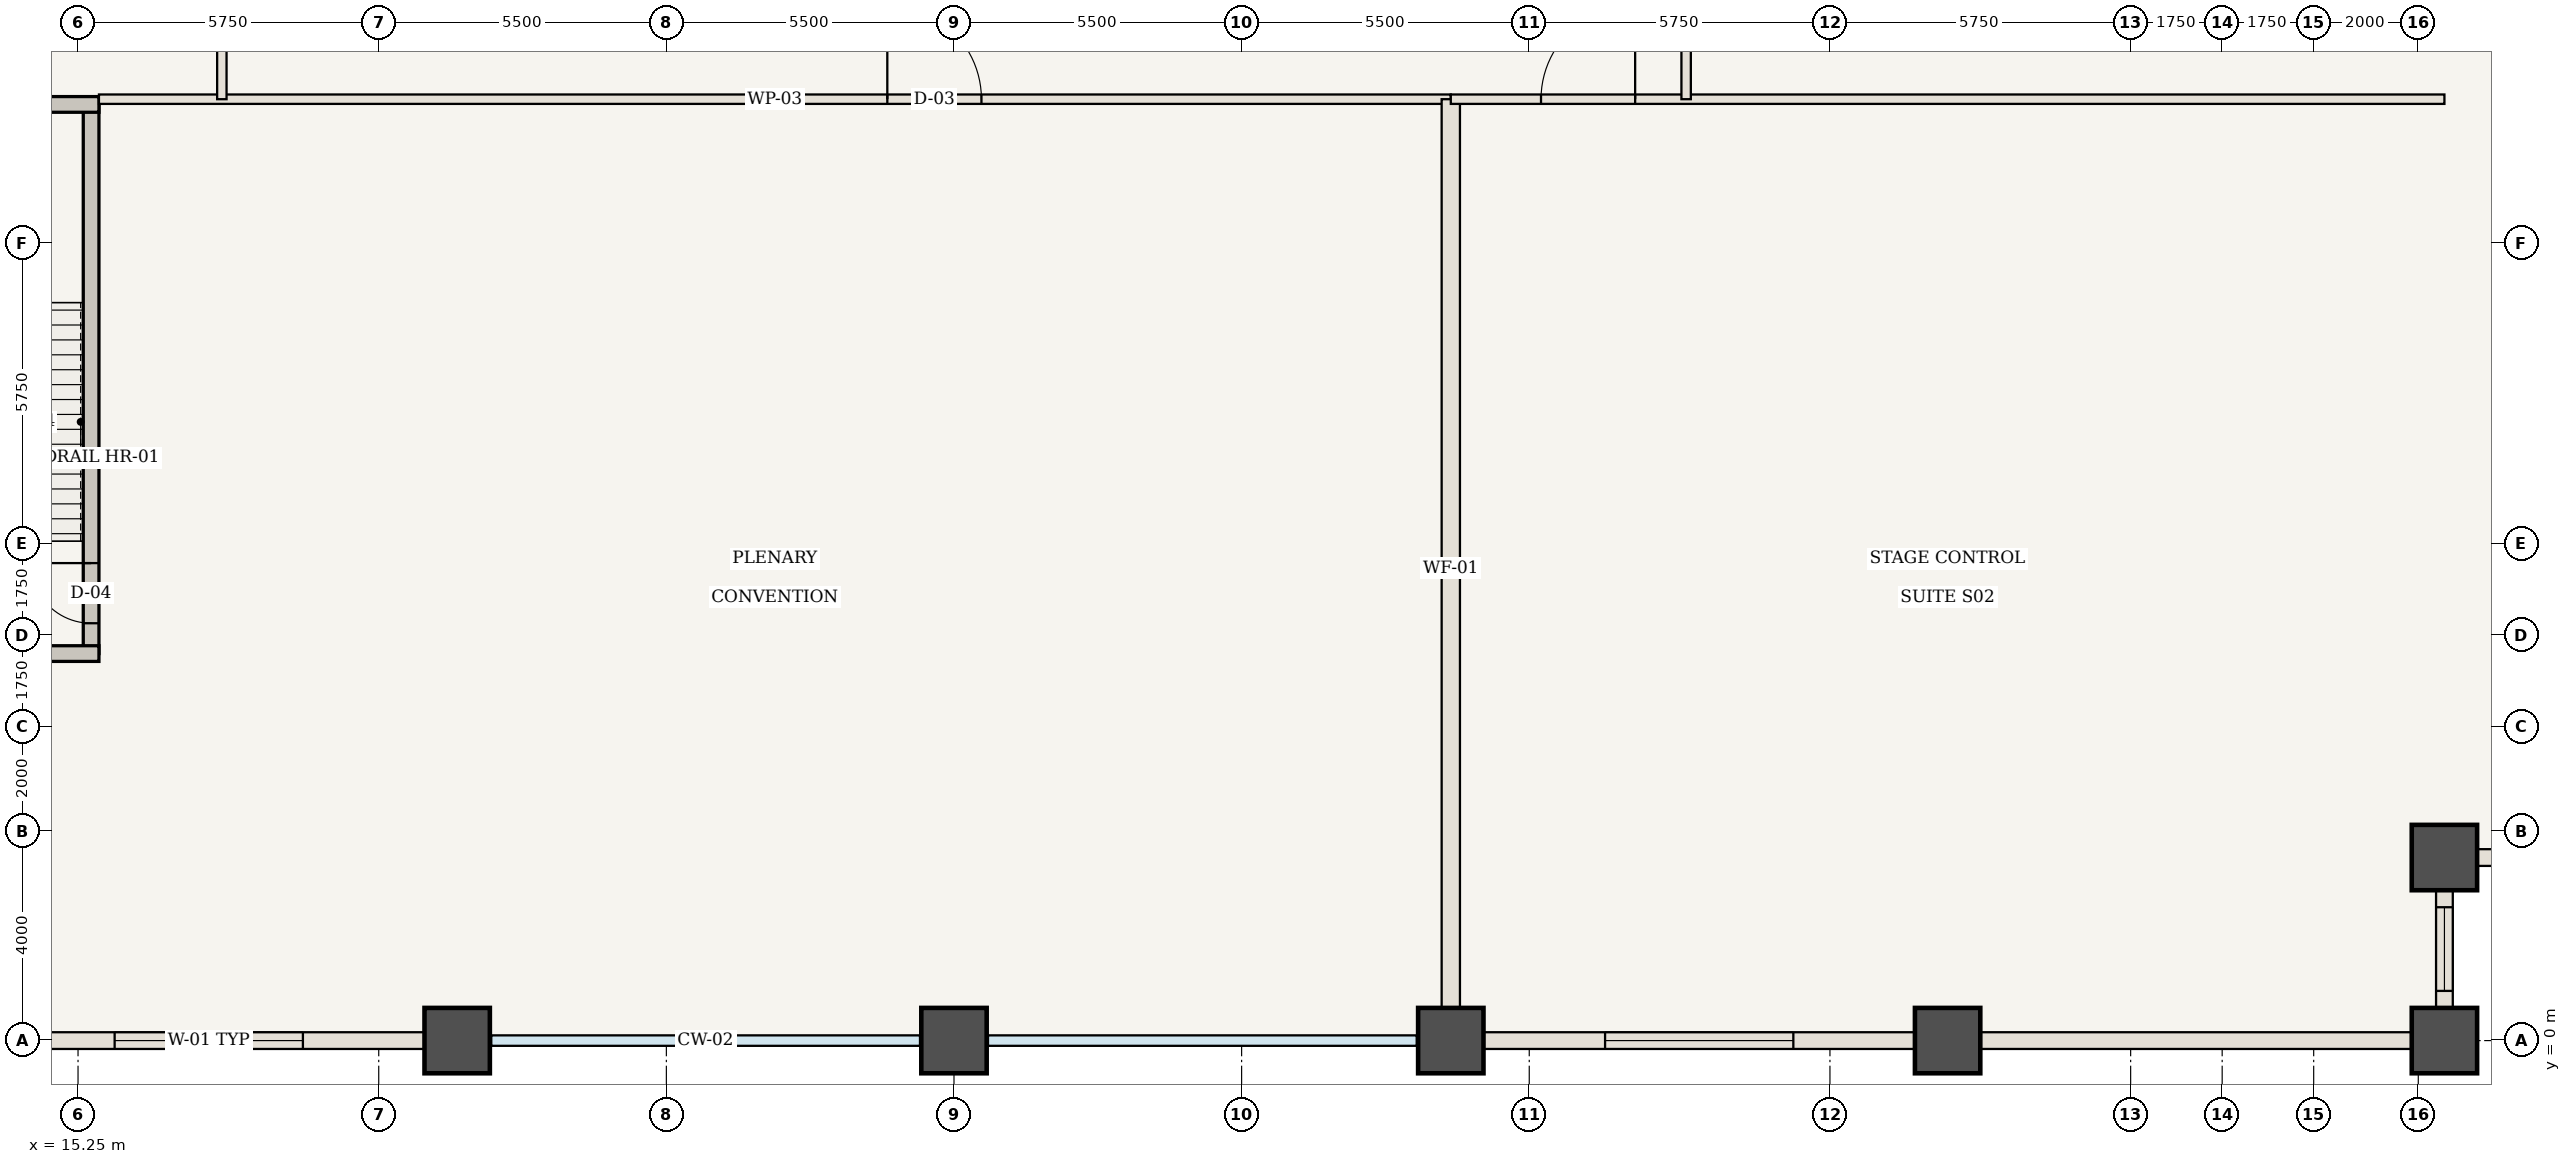
"""IFC4 building model, lengths in metres.
Left out: names, types, materials, properties, quantities, classifications, styles, units other than length and angle.
Written with IfcOpenShell. Run it as: python <this file> out.ifc"""

import sys

from ifc_helpers import new_model, si_unit, direction, frame, frame_2d, origin, origin_2d, place, context, subcontext, project, spatial, rectangle, extrude, element, fill, save


model = new_model("IFC4")
c1 = context("Model", 3, precision=1e-05, world=origin(), true_north=direction((0.0, 1.0)))
c2 = subcontext(c1, "Body", "Model", "MODEL_VIEW")
j1 = project(units=[si_unit("LENGTHUNIT", "METRE"), si_unit("PLANEANGLEUNIT", "RADIAN")], contexts=[c1])
p1 = place(None, origin())
s1 = spatial("IfcSite", under=j1, at=p1, CompositionType="ELEMENT")
p2 = place(p1, origin())
s2 = spatial("IfcBuilding", under=s1, at=p2, CompositionType="ELEMENT")
p3 = place(p2, frame((0.0, 0.0, 17.85)))
s3 = spatial("IfcBuildingStorey", under=s2, at=p3, CompositionType="ELEMENT", Elevation=17.85)
for number, where, z_axis, x_axis in (
    (1, (60.5, 0.0, 0.0), (0.0, 0.0, 1.0), (1.0, 0.0, 0.0)),
    (2, (60.5, 3.5, 0.0), (0.0, 0.0, 1.0), (1.0, 0.0, 0.0)),
    (3, (22.5, 0.0, 0.0), (0.0, 0.0, 1.0), (1.0, 0.0, 0.0)),
    (4, (32.0, 0.0, 0.0), (0.0, 0.0, 1.0), (1.0, 0.0, 0.0)),
    (5, (41.5, 0.0, 0.0), (0.0, 0.0, 1.0), (1.0, 0.0, 0.0)),
    (6, (51.0, 0.0, 0.0), (0.0, 0.0, 1.0), (1.0, 0.0, 0.0)),
):
    element("IfcColumn", number, at=place(p3, frame(where, z_axis=z_axis, x_axis=x_axis)), inside=s3, PredefinedType="COLUMN", context=c2, shape_type="SweptSolid", body=[
        extrude(rectangle(XDim=1.25, YDim=1.25, at=origin_2d()), origin(), (0.0, 0.0, 1.0), 5.95),
    ])
p4 = place(p3, frame((15.5, 7.4, 0.0), z_axis=(0.0, 0.0, 1.0), x_axis=(0.0, 1.0, 0.0)))
e7 = element("IfcWall", 7, at=p4, inside=s3, PredefinedType="SHEAR", context=c2, shape_type="SweptSolid", body=[
    extrude(rectangle(XDim=10.5, YDim=0.3, at=frame_2d((5.25, 0.0))), origin(), (0.0, 0.0, 1.0), 5.71),
])
p5 = place(p4, frame((0.58, 0.0, 0.0)))
e8 = element("IfcOpeningElement", 8, at=p5, cuts=e7, PredefinedType="OPENING", context=c2, shape_type="SweptSolid", body=[
    extrude(rectangle(XDim=1.15, YDim=2.15, at=frame_2d((0.575, 1.075))), frame((0.0, 0.16, 0.0), z_axis=(0.0, -1.0, 0.0), x_axis=(1.0, 0.0, 0.0)), (0.0, 0.0, 1.0), 0.32),
])
for number, where, z_axis, x_axis in (
    (9, (10.9, 7.4, 0.0), (0.0, 0.0, 1.0), (1.0, 0.0, 0.0)),
    (10, (10.9, 17.9, 0.0), (0.0, 0.0, 1.0), (1.0, 0.0, 0.0)),
):
    element("IfcWall", number, at=place(p3, frame(where, z_axis=z_axis, x_axis=x_axis)), inside=s3, PredefinedType="SHEAR", context=c2, shape_type="SweptSolid", body=[
        extrude(rectangle(XDim=4.75, YDim=0.3, at=frame_2d((2.375, 0.0))), origin(), (0.0, 0.0, 1.0), 5.71),
    ])
p6 = place(p3, frame((15.65, 18.0, 0.0), z_axis=(0.0, 0.0, 1.0), x_axis=(1.0, 0.0, 0.0)))
e11 = element("IfcWall", 11, at=p6, inside=s3, PredefinedType="STANDARD", context=c2, shape_type="SweptSolid", body=[
    extrude(rectangle(XDim=25.85, YDim=0.18, at=frame_2d((12.925, 0.0))), origin(), (0.0, 0.0, 1.0), 5.71),
])
p7 = place(p6, frame((15.075, 0.0, 0.0)))
e12 = element("IfcOpeningElement", 12, at=p7, cuts=e11, PredefinedType="OPENING", context=c2, shape_type="SweptSolid", body=[
    extrude(rectangle(XDim=1.8, YDim=2.35, at=frame_2d((0.9, 1.175))), frame((0.0, 0.1, 0.0), z_axis=(0.0, -1.0, 0.0), x_axis=(1.0, 0.0, 0.0)), (0.0, 0.0, 1.0), 0.2),
])
p8 = place(p3, frame((41.5, 0.06, 0.0), z_axis=(0.0, 0.0, 1.0), x_axis=(0.0, 1.0, 0.0)))
e13 = element("IfcWall", 13, at=p8, inside=s3, PredefinedType="STANDARD", context=c2, shape_type="SweptSolid", body=[
    extrude(rectangle(XDim=17.94, YDim=0.35, at=frame_2d((8.97, 0.0))), origin(), (0.0, 0.0, 1.0), 5.71),
])
p9 = place(p3, frame((41.5, 18.0, 0.0), z_axis=(0.0, 0.0, 1.0), x_axis=(1.0, 0.0, 0.0)))
e14 = element("IfcWall", 14, at=p9, inside=s3, PredefinedType="STANDARD", context=c2, shape_type="SweptSolid", body=[
    extrude(rectangle(XDim=19.0, YDim=0.18, at=frame_2d((9.5, 0.0))), origin(), (0.0, 0.0, 1.0), 5.71),
])
p10 = place(p9, frame((1.725, 0.0, 0.0)))
e15 = element("IfcOpeningElement", 15, at=p10, cuts=e14, PredefinedType="OPENING", context=c2, shape_type="SweptSolid", body=[
    extrude(rectangle(XDim=1.8, YDim=2.35, at=frame_2d((0.9, 1.175))), frame((0.0, 0.1, 0.0), z_axis=(0.0, -1.0, 0.0), x_axis=(1.0, 0.0, 0.0)), (0.0, 0.0, 1.0), 0.2),
])
p11 = place(p3, frame((18.0, 18.0, 0.0), z_axis=(0.0, 0.0, 1.0), x_axis=(0.0, 1.0, 0.0)))
e16 = element("IfcWall", 16, at=p11, inside=s3, PredefinedType="STANDARD", context=c2, shape_type="SweptSolid", body=[
    extrude(rectangle(XDim=13.2, YDim=0.18, at=frame_2d((6.6, 0.0))), origin(), (0.0, 0.0, 1.0), 5.71),
])
p12 = place(p11, frame((6.1, 0.0, 0.0)))
e17 = element("IfcOpeningElement", 17, at=p12, cuts=e16, PredefinedType="OPENING", context=c2, shape_type="SweptSolid", body=[
    extrude(rectangle(XDim=0.95, YDim=2.15, at=frame_2d((0.475, 1.075))), frame((0.0, 0.1, 0.0), z_axis=(0.0, -1.0, 0.0), x_axis=(1.0, 0.0, 0.0)), (0.0, 0.0, 1.0), 0.2),
])
p13 = place(p3, frame((46.0, 18.0, 0.0), z_axis=(0.0, 0.0, 1.0), x_axis=(0.0, 1.0, 0.0)))
e18 = element("IfcWall", 18, at=p13, inside=s3, PredefinedType="STANDARD", context=c2, shape_type="SweptSolid", body=[
    extrude(rectangle(XDim=14.8, YDim=0.18, at=frame_2d((7.4, 0.0))), origin(), (0.0, 0.0, 1.0), 5.71),
])
p14 = place(p13, frame((6.9, 0.0, 0.0)))
e19 = element("IfcOpeningElement", 19, at=p14, cuts=e18, PredefinedType="OPENING", context=c2, shape_type="SweptSolid", body=[
    extrude(rectangle(XDim=0.95, YDim=2.15, at=frame_2d((0.475, 1.075))), frame((0.0, 0.1, 0.0), z_axis=(0.0, -1.0, 0.0), x_axis=(1.0, 0.0, 0.0)), (0.0, 0.0, 1.0), 0.2),
])
p15 = place(p3, frame((22.5, 0.0, 0.0), z_axis=(0.0, 0.0, 1.0), x_axis=(-1.0, 0.0, 0.0)))
e20 = element("IfcWall", 20, at=p15, inside=s3, PredefinedType="USERDEFINED", context=c2, shape_type="SweptSolid", body=[
    extrude(rectangle(XDim=9.5, YDim=0.32, at=frame_2d((4.75, 0.0))), origin(), (0.0, 0.0, 1.0), 4.81),
])
p16 = place(p15, frame((2.95, 0.0, 0.85)))
e21 = element("IfcOpeningElement", 21, at=p16, cuts=e20, PredefinedType="OPENING", context=c2, shape_type="SweptSolid", body=[
    extrude(rectangle(XDim=3.6, YDim=2.6, at=frame_2d((1.8, 1.3))), frame((0.0, 0.17, 0.0), z_axis=(0.0, -1.0, 0.0), x_axis=(1.0, 0.0, 0.0)), (0.0, 0.0, 1.0), 0.34),
])
p17 = place(p3, frame((51.0, 0.0, 0.0), z_axis=(0.0, 0.0, 1.0), x_axis=(-1.0, 0.0, 0.0)))
e22 = element("IfcWall", 22, at=p17, inside=s3, PredefinedType="USERDEFINED", context=c2, shape_type="SweptSolid", body=[
    extrude(rectangle(XDim=9.5, YDim=0.32, at=frame_2d((4.75, 0.0))), origin(), (0.0, 0.0, 1.0), 4.81),
])
p18 = place(p17, frame((2.95, 0.0, 0.85)))
e23 = element("IfcOpeningElement", 23, at=p18, cuts=e22, PredefinedType="OPENING", context=c2, shape_type="SweptSolid", body=[
    extrude(rectangle(XDim=3.6, YDim=2.6, at=frame_2d((1.8, 1.3))), frame((0.0, 0.17, 0.0), z_axis=(0.0, -1.0, 0.0), x_axis=(1.0, 0.0, 0.0)), (0.0, 0.0, 1.0), 0.34),
])
p19 = place(p3, frame((60.5, 0.0, 0.0), z_axis=(0.0, 0.0, 1.0), x_axis=(-1.0, 0.0, 0.0)))
e24 = element("IfcWall", 24, at=p19, inside=s3, PredefinedType="USERDEFINED", context=c2, shape_type="SweptSolid", body=[
    extrude(rectangle(XDim=9.5, YDim=0.32, at=frame_2d((4.75, 0.0))), origin(), (0.0, 0.0, 1.0), 4.81),
])
p20 = place(p3, frame((60.5, 3.5, 0.0), z_axis=(0.0, 0.0, 1.0), x_axis=(0.0, -1.0, 0.0)))
e25 = element("IfcWall", 25, at=p20, inside=s3, PredefinedType="USERDEFINED", context=c2, shape_type="SweptSolid", body=[
    extrude(rectangle(XDim=3.5, YDim=0.32, at=frame_2d((1.75, 0.0))), origin(), (0.0, 0.0, 1.0), 4.81),
])
p21 = place(p20, frame((0.95, 0.0, 0.85)))
e26 = element("IfcOpeningElement", 26, at=p21, cuts=e25, PredefinedType="OPENING", context=c2, shape_type="SweptSolid", body=[
    extrude(rectangle(XDim=1.6, YDim=2.05, at=frame_2d((0.8, 1.025))), frame((0.0, 0.17, 0.0), z_axis=(0.0, -1.0, 0.0), x_axis=(1.0, 0.0, 0.0)), (0.0, 0.0, 1.0), 0.34),
])
p22 = place(p3, frame((64.0, 3.5, 0.0), z_axis=(0.0, 0.0, 1.0), x_axis=(-1.0, 0.0, 0.0)))
e27 = element("IfcWall", 27, at=p22, inside=s3, PredefinedType="USERDEFINED", context=c2, shape_type="SweptSolid", body=[
    extrude(rectangle(XDim=3.5, YDim=0.32, at=frame_2d((1.75, 0.0))), origin(), (0.0, 0.0, 1.0), 4.81),
])
p23 = place(p22, frame((0.95, 0.0, 0.85)))
e28 = element("IfcOpeningElement", 28, at=p23, cuts=e27, PredefinedType="OPENING", context=c2, shape_type="SweptSolid", body=[
    extrude(rectangle(XDim=1.6, YDim=2.05, at=frame_2d((0.8, 1.025))), frame((0.0, 0.17, 0.0), z_axis=(0.0, -1.0, 0.0), x_axis=(1.0, 0.0, 0.0)), (0.0, 0.0, 1.0), 0.34),
])
p24 = place(p5, origin())
e29 = element("IfcDoor", 29, at=p24, inside=s3, OperationType="SINGLE_SWING_RIGHT", PredefinedType="DOOR", context=c2, shape_type="SweptSolid", body=[
    extrude(rectangle(XDim=1.15, YDim=2.15, at=frame_2d((0.575, 1.075))), frame((0.0, 0.025, 0.0), z_axis=(0.0, -1.0, 0.0), x_axis=(1.0, 0.0, 0.0)), (0.0, 0.0, 1.0), 0.05),
])
fill(e8, e29)
p25 = place(p7, origin())
e30 = element("IfcDoor", 30, at=p25, inside=s3, OperationType="SINGLE_SWING_LEFT", PredefinedType="DOOR", context=c2, shape_type="SweptSolid", body=[
    extrude(rectangle(XDim=1.8, YDim=2.35, at=frame_2d((0.9, 1.175))), frame((0.0, 0.025, 0.0), z_axis=(0.0, -1.0, 0.0), x_axis=(1.0, 0.0, 0.0)), (0.0, 0.0, 1.0), 0.05),
])
fill(e12, e30)
p26 = place(p10, origin())
e31 = element("IfcDoor", 31, at=p26, inside=s3, OperationType="SINGLE_SWING_RIGHT", PredefinedType="DOOR", context=c2, shape_type="SweptSolid", body=[
    extrude(rectangle(XDim=1.8, YDim=2.35, at=frame_2d((0.9, 1.175))), frame((0.0, 0.025, 0.0), z_axis=(0.0, -1.0, 0.0), x_axis=(1.0, 0.0, 0.0)), (0.0, 0.0, 1.0), 0.05),
])
fill(e15, e31)
p27 = place(p16, origin())
e32 = element("IfcWindow", 32, at=p27, inside=s3, PartitioningType="SINGLE_PANEL", PredefinedType="WINDOW", context=c2, shape_type="SweptSolid", body=[
    extrude(rectangle(XDim=3.6, YDim=2.6, at=frame_2d((1.8, 1.3))), frame((0.0, 0.03, 0.0), z_axis=(0.0, -1.0, 0.0), x_axis=(1.0, 0.0, 0.0)), (0.0, 0.0, 1.0), 0.06),
])
fill(e21, e32)
p28 = place(p18, origin())
e33 = element("IfcWindow", 33, at=p28, inside=s3, PartitioningType="SINGLE_PANEL", PredefinedType="WINDOW", context=c2, shape_type="SweptSolid", body=[
    extrude(rectangle(XDim=3.6, YDim=2.6, at=frame_2d((1.8, 1.3))), frame((0.0, 0.03, 0.0), z_axis=(0.0, -1.0, 0.0), x_axis=(1.0, 0.0, 0.0)), (0.0, 0.0, 1.0), 0.06),
])
fill(e23, e33)
p29 = place(p21, origin())
e34 = element("IfcWindow", 34, at=p29, inside=s3, PartitioningType="SINGLE_PANEL", PredefinedType="WINDOW", context=c2, shape_type="SweptSolid", body=[
    extrude(rectangle(XDim=1.6, YDim=2.05, at=frame_2d((0.8, 1.025))), frame((0.0, 0.03, 0.0), z_axis=(0.0, -1.0, 0.0), x_axis=(1.0, 0.0, 0.0)), (0.0, 0.0, 1.0), 0.06),
])
fill(e26, e34)
save(model, sys.argv[1])
